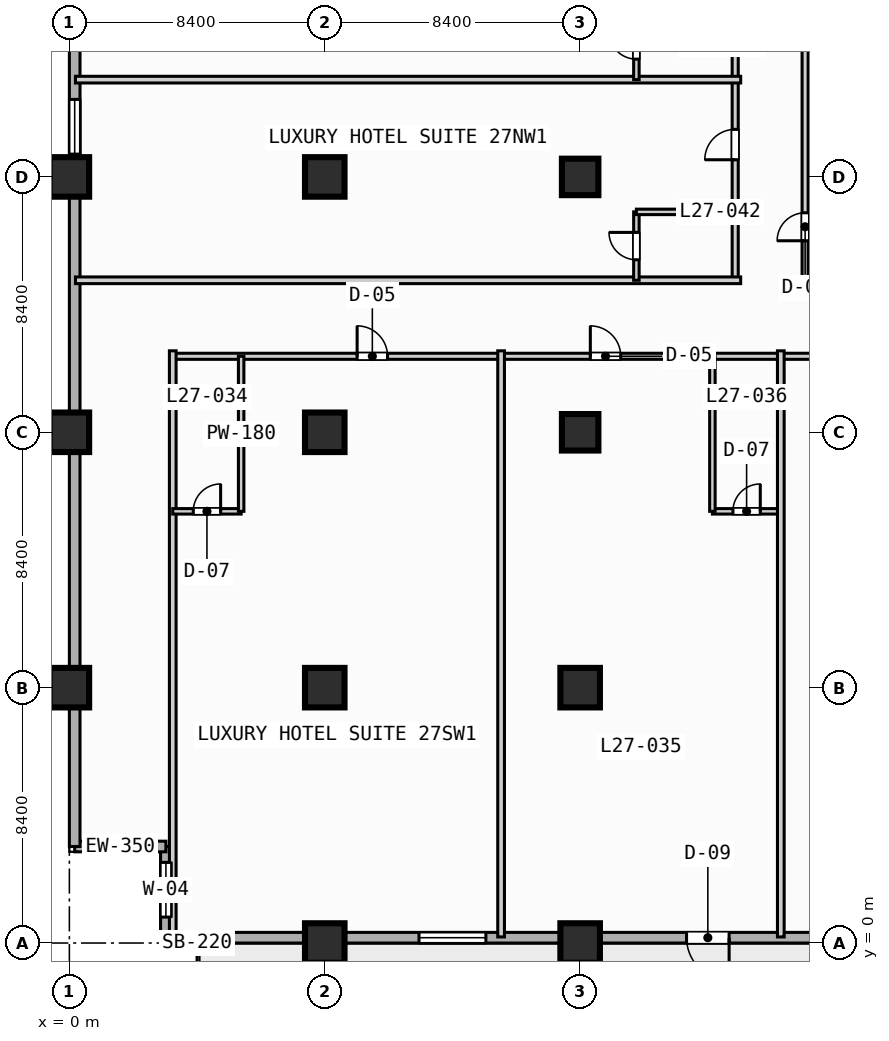
"""IFC4 building model, lengths in metres.
Left out: names, types, materials, properties, quantities, classifications, styles, units other than length and angle.
Written with IfcOpenShell. Run it as: python <this file> out.ifc"""

import sys

from ifc_helpers import new_model, si_unit, direction, frame, frame_2d, origin, origin_2d, place, context, subcontext, project, spatial, rectangle, extrude, element, fill, save


model = new_model("IFC4")
c1 = context("Model", 3, precision=1e-05, world=origin(), true_north=direction((0.0, 1.0)))
c2 = subcontext(c1, "Body", "Model", "MODEL_VIEW")
j1 = project(units=[si_unit("LENGTHUNIT", "METRE"), si_unit("PLANEANGLEUNIT", "RADIAN")], contexts=[c1])
p1 = place(None, origin())
s1 = spatial("IfcSite", under=j1, at=p1, CompositionType="ELEMENT")
p2 = place(p1, origin())
s2 = spatial("IfcBuilding", under=s1, at=p2, CompositionType="ELEMENT")
p3 = place(p2, frame((0.0, 0.0, 115.2)))
s3 = spatial("IfcBuildingStorey", under=s2, at=p3, CompositionType="ELEMENT", Elevation=115.2)
for number, where, z_axis, x_axis in (
    (1, (0.0, 8.4, 0.0), (0.0, 0.0, 1.0), (1.0, 0.0, 0.0)),
    (2, (0.0, 16.8, 0.0), (0.0, 0.0, 1.0), (1.0, 0.0, 0.0)),
    (3, (0.0, 25.2, 0.0), (0.0, 0.0, 1.0), (1.0, 0.0, 0.0)),
    (4, (8.4, 0.0, 0.0), (0.0, 0.0, 1.0), (1.0, 0.0, 0.0)),
    (5, (8.4, 8.4, 0.0), (0.0, 0.0, 1.0), (1.0, 0.0, 0.0)),
    (6, (8.4, 16.8, 0.0), (0.0, 0.0, 1.0), (1.0, 0.0, 0.0)),
    (7, (8.4, 25.2, 0.0), (0.0, 0.0, 1.0), (1.0, 0.0, 0.0)),
    (8, (16.8, 0.0, 0.0), (0.0, 0.0, 1.0), (1.0, 0.0, 0.0)),
    (9, (16.8, 8.4, 0.0), (0.0, 0.0, 1.0), (1.0, 0.0, 0.0)),
):
    element("IfcColumn", number, at=place(p3, frame(where, z_axis=z_axis, x_axis=x_axis)), inside=s3, PredefinedType="COLUMN", context=c2, shape_type="SweptSolid", body=[
        extrude(rectangle(XDim=1.3, YDim=1.3, at=origin_2d()), origin(), (0.0, 0.0, 1.0), 3.8),
    ])
for number, where, z_axis, x_axis in (
    (10, (16.8, 16.8, 0.0), (0.0, 0.0, 1.0), (1.0, 0.0, 0.0)),
    (11, (16.8, 25.2, 0.0), (0.0, 0.0, 1.0), (1.0, 0.0, 0.0)),
):
    element("IfcColumn", number, at=place(p3, frame(where, z_axis=z_axis, x_axis=x_axis)), inside=s3, PredefinedType="COLUMN", context=c2, shape_type="SweptSolid", body=[
        extrude(rectangle(XDim=1.2, YDim=1.2, at=origin_2d()), origin(), (0.0, 0.0, 1.0), 3.8),
    ])
p4 = place(p3, frame((3.175, 0.175, 0.0), z_axis=(0.0, 0.0, 1.0), x_axis=(0.0, 1.0, 0.0)))
e12 = element("IfcWall", 12, at=p4, inside=s3, PredefinedType="STANDARD", context=c2, shape_type="SweptSolid", body=[
    extrude(rectangle(XDim=3.0, YDim=0.35, at=frame_2d((1.5, 0.0))), origin(), (0.0, 0.0, 1.0), 3.55),
])
p5 = place(p4, frame((0.677, 0.0, 0.85)))
e13 = element("IfcOpeningElement", 13, at=p5, cuts=e12, PredefinedType="OPENING", context=c2, shape_type="SweptSolid", body=[
    extrude(rectangle(XDim=1.8, YDim=1.8, at=frame_2d((0.9, 0.9))), frame((0.0, 0.185, 0.0), z_axis=(0.0, -1.0, 0.0), x_axis=(1.0, 0.0, 0.0)), (0.0, 0.0, 1.0), 0.37),
])
p6 = place(p3, frame((3.175, 3.175, 0.0), z_axis=(0.0, 0.0, 1.0), x_axis=(-1.0, 0.0, 0.0)))
e14 = element("IfcWall", 14, at=p6, inside=s3, PredefinedType="STANDARD", context=c2, shape_type="SweptSolid", body=[
    extrude(rectangle(XDim=3.0, YDim=0.35, at=frame_2d((1.5, 0.0))), origin(), (0.0, 0.0, 1.0), 3.55),
])
p7 = place(p3, frame((0.175, 3.175, 0.0), z_axis=(0.0, 0.0, 1.0), x_axis=(0.0, 1.0, 0.0)))
e15 = element("IfcWall", 15, at=p7, inside=s3, PredefinedType="STANDARD", context=c2, shape_type="SweptSolid", body=[
    extrude(rectangle(XDim=86.05, YDim=0.35, at=frame_2d((43.025, 0.0))), origin(), (0.0, 0.0, 1.0), 3.55),
])
p8 = place(p7, frame((42.325, 0.0, 0.0)))
e16 = element("IfcOpeningElement", 16, at=p8, cuts=e15, PredefinedType="OPENING", context=c2, shape_type="SweptSolid", body=[
    extrude(rectangle(XDim=1.4, YDim=2.2, at=frame_2d((0.7, 1.1))), frame((0.0, 0.185, 0.0), z_axis=(0.0, -1.0, 0.0), x_axis=(1.0, 0.0, 0.0)), (0.0, 0.0, 1.0), 0.37),
])
p9 = place(p7, frame((33.525, 0.0, 0.85)))
e17 = element("IfcOpeningElement", 17, at=p9, cuts=e15, PredefinedType="OPENING", context=c2, shape_type="SweptSolid", body=[
    extrude(rectangle(XDim=2.2, YDim=1.8, at=frame_2d((1.1, 0.9))), frame((0.0, 0.185, 0.0), z_axis=(0.0, -1.0, 0.0), x_axis=(1.0, 0.0, 0.0)), (0.0, 0.0, 1.0), 0.37),
])
p10 = place(p7, frame((22.775, 0.0, 0.85)))
e18 = element("IfcOpeningElement", 18, at=p10, cuts=e15, PredefinedType="OPENING", context=c2, shape_type="SweptSolid", body=[
    extrude(rectangle(XDim=1.8, YDim=1.8, at=frame_2d((0.9, 0.9))), frame((0.0, 0.185, 0.0), z_axis=(0.0, -1.0, 0.0), x_axis=(1.0, 0.0, 0.0)), (0.0, 0.0, 1.0), 0.37),
])
p11 = place(p7, frame((27.625, 0.0, 0.85)))
e19 = element("IfcOpeningElement", 19, at=p11, cuts=e15, PredefinedType="OPENING", context=c2, shape_type="SweptSolid", body=[
    extrude(rectangle(XDim=1.8, YDim=1.8, at=frame_2d((0.9, 0.9))), frame((0.0, 0.185, 0.0), z_axis=(0.0, -1.0, 0.0), x_axis=(1.0, 0.0, 0.0)), (0.0, 0.0, 1.0), 0.37),
])
p12 = place(p3, frame((72.425, 0.175, 0.0), z_axis=(0.0, 0.0, 1.0), x_axis=(-1.0, 0.0, 0.0)))
e20 = element("IfcWall", 20, at=p12, inside=s3, PredefinedType="STANDARD", context=c2, shape_type="SweptSolid", body=[
    extrude(rectangle(XDim=69.25, YDim=0.35, at=frame_2d((34.625, 0.0))), origin(), (0.0, 0.0, 1.0), 3.55),
])
p13 = place(p12, frame((50.725, 0.0, 0.0)))
e21 = element("IfcOpeningElement", 21, at=p13, cuts=e20, PredefinedType="OPENING", context=c2, shape_type="SweptSolid", body=[
    extrude(rectangle(XDim=1.4, YDim=2.2, at=frame_2d((0.7, 1.1))), frame((0.0, 0.185, 0.0), z_axis=(0.0, -1.0, 0.0), x_axis=(1.0, 0.0, 0.0)), (0.0, 0.0, 1.0), 0.37),
])
p14 = place(p12, frame((58.725, 0.0, 0.85)))
e22 = element("IfcOpeningElement", 22, at=p14, cuts=e20, PredefinedType="OPENING", context=c2, shape_type="SweptSolid", body=[
    extrude(rectangle(XDim=2.2, YDim=1.8, at=frame_2d((1.1, 0.9))), frame((0.0, 0.185, 0.0), z_axis=(0.0, -1.0, 0.0), x_axis=(1.0, 0.0, 0.0)), (0.0, 0.0, 1.0), 0.37),
])
p15 = place(p12, frame((41.925, 0.0, 0.85)))
e23 = element("IfcOpeningElement", 23, at=p15, cuts=e20, PredefinedType="OPENING", context=c2, shape_type="SweptSolid", body=[
    extrude(rectangle(XDim=2.2, YDim=1.8, at=frame_2d((1.1, 0.9))), frame((0.0, 0.185, 0.0), z_axis=(0.0, -1.0, 0.0), x_axis=(1.0, 0.0, 0.0)), (0.0, 0.0, 1.0), 0.37),
])
p16 = place(p12, frame((33.525, 0.0, 0.85)))
e24 = element("IfcOpeningElement", 24, at=p16, cuts=e20, PredefinedType="OPENING", context=c2, shape_type="SweptSolid", body=[
    extrude(rectangle(XDim=2.2, YDim=1.8, at=frame_2d((1.1, 0.9))), frame((0.0, 0.185, 0.0), z_axis=(0.0, -1.0, 0.0), x_axis=(1.0, 0.0, 0.0)), (0.0, 0.0, 1.0), 0.37),
])
p17 = place(p12, frame((25.125, 0.0, 0.85)))
e25 = element("IfcOpeningElement", 25, at=p17, cuts=e20, PredefinedType="OPENING", context=c2, shape_type="SweptSolid", body=[
    extrude(rectangle(XDim=2.2, YDim=1.8, at=frame_2d((1.1, 0.9))), frame((0.0, 0.185, 0.0), z_axis=(0.0, -1.0, 0.0), x_axis=(1.0, 0.0, 0.0)), (0.0, 0.0, 1.0), 0.37),
])
p18 = place(p12, frame((8.325, 0.0, 0.85)))
e26 = element("IfcOpeningElement", 26, at=p18, cuts=e20, PredefinedType="OPENING", context=c2, shape_type="SweptSolid", body=[
    extrude(rectangle(XDim=2.2, YDim=1.8, at=frame_2d((1.1, 0.9))), frame((0.0, 0.185, 0.0), z_axis=(0.0, -1.0, 0.0), x_axis=(1.0, 0.0, 0.0)), (0.0, 0.0, 1.0), 0.37),
])
p19 = place(p12, frame((2.125, 0.0, 0.85)))
e27 = element("IfcOpeningElement", 27, at=p19, cuts=e20, PredefinedType="OPENING", context=c2, shape_type="SweptSolid", body=[
    extrude(rectangle(XDim=1.8, YDim=1.8, at=frame_2d((0.9, 0.9))), frame((0.0, 0.185, 0.0), z_axis=(0.0, -1.0, 0.0), x_axis=(1.0, 0.0, 0.0)), (0.0, 0.0, 1.0), 0.37),
])
p20 = place(p3, frame((24.2, 21.6, 0.0), z_axis=(0.0, 0.0, 1.0), x_axis=(0.0, 1.0, 0.0)))
e28 = element("IfcWall", 28, at=p20, inside=s3, PredefinedType="PARTITIONING", context=c2, shape_type="SweptSolid", body=[
    extrude(rectangle(XDim=17.6, YDim=0.2, at=frame_2d((8.8, 0.0))), origin(), (0.0, 0.0, 1.0), 3.55),
])
p21 = place(p20, frame((1.5, 0.0, 0.0)))
e29 = element("IfcOpeningElement", 29, at=p21, cuts=e28, PredefinedType="OPENING", context=c2, shape_type="SweptSolid", body=[
    extrude(rectangle(XDim=0.92, YDim=2.1, at=frame_2d((0.46, 1.05))), frame((0.0, 0.11, 0.0), z_axis=(0.0, -1.0, 0.0), x_axis=(1.0, 0.0, 0.0)), (0.0, 0.0, 1.0), 0.22),
])
p22 = place(p20, frame((9.95, 0.0, 0.0)))
e30 = element("IfcOpeningElement", 30, at=p22, cuts=e28, PredefinedType="OPENING", context=c2, shape_type="SweptSolid", body=[
    extrude(rectangle(XDim=0.92, YDim=2.1, at=frame_2d((0.46, 1.05))), frame((0.0, 0.11, 0.0), z_axis=(0.0, -1.0, 0.0), x_axis=(1.0, 0.0, 0.0)), (0.0, 0.0, 1.0), 0.22),
])
p23 = place(p3, frame((24.2, 21.6, 0.0), z_axis=(0.0, 0.0, 1.0), x_axis=(1.0, 0.0, 0.0)))
e31 = element("IfcWall", 31, at=p23, inside=s3, PredefinedType="PARTITIONING", context=c2, shape_type="SweptSolid", body=[
    extrude(rectangle(XDim=9.1, YDim=0.2, at=frame_2d((4.55, 0.0))), origin(), (0.0, 0.0, 1.0), 3.55),
])
p24 = place(p3, frame((3.4, 19.3, 0.0), z_axis=(0.0, 0.0, 1.0), x_axis=(1.0, 0.0, 0.0)))
e32 = element("IfcWall", 32, at=p24, inside=s3, PredefinedType="PARTITIONING", context=c2, shape_type="SweptSolid", body=[
    extrude(rectangle(XDim=35.8, YDim=0.2, at=frame_2d((17.9, 0.0))), origin(), (0.0, 0.0, 1.0), 3.55),
])
p25 = place(p24, frame((6.065, 0.0, 0.0)))
e33 = element("IfcOpeningElement", 33, at=p25, cuts=e32, PredefinedType="OPENING", context=c2, shape_type="SweptSolid", body=[
    extrude(rectangle(XDim=1.0, YDim=2.15, at=frame_2d((0.5, 1.075))), frame((0.0, 0.11, 0.0), z_axis=(0.0, -1.0, 0.0), x_axis=(1.0, 0.0, 0.0)), (0.0, 0.0, 1.0), 0.22),
])
p26 = place(p24, frame((13.735, 0.0, 0.0)))
e34 = element("IfcOpeningElement", 34, at=p26, cuts=e32, PredefinedType="OPENING", context=c2, shape_type="SweptSolid", body=[
    extrude(rectangle(XDim=1.0, YDim=2.15, at=frame_2d((0.5, 1.075))), frame((0.0, 0.11, 0.0), z_axis=(0.0, -1.0, 0.0), x_axis=(1.0, 0.0, 0.0)), (0.0, 0.0, 1.0), 0.22),
])
p27 = place(p24, frame((22.96, 0.0, 0.0)))
e35 = element("IfcOpeningElement", 35, at=p27, cuts=e32, PredefinedType="OPENING", context=c2, shape_type="SweptSolid", body=[
    extrude(rectangle(XDim=1.0, YDim=2.15, at=frame_2d((0.5, 1.075))), frame((0.0, 0.11, 0.0), z_axis=(0.0, -1.0, 0.0), x_axis=(1.0, 0.0, 0.0)), (0.0, 0.0, 1.0), 0.22),
])
p28 = place(p24, frame((30.86, 0.0, 0.0)))
e36 = element("IfcOpeningElement", 36, at=p28, cuts=e32, PredefinedType="OPENING", context=c2, shape_type="SweptSolid", body=[
    extrude(rectangle(XDim=1.0, YDim=2.15, at=frame_2d((0.5, 1.075))), frame((0.0, 0.11, 0.0), z_axis=(0.0, -1.0, 0.0), x_axis=(1.0, 0.0, 0.0)), (0.0, 0.0, 1.0), 0.22),
])
p29 = place(p3, frame((3.4, 0.2, 0.0), z_axis=(0.0, 0.0, 1.0), x_axis=(0.0, 1.0, 0.0)))
e37 = element("IfcWall", 37, at=p29, inside=s3, PredefinedType="PARTITIONING", context=c2, shape_type="SweptSolid", body=[
    extrude(rectangle(XDim=19.28, YDim=0.22, at=frame_2d((9.64, 0.0))), origin(), (0.0, 0.0, 1.0), 3.55),
])
p30 = place(p3, frame((3.4, 14.2, 0.0), z_axis=(0.0, 0.0, 1.0), x_axis=(1.0, 0.0, 0.0)))
e38 = element("IfcWall", 38, at=p30, inside=s3, PredefinedType="PLUMBINGWALL", context=c2, shape_type="SweptSolid", body=[
    extrude(rectangle(XDim=2.25, YDim=0.18, at=frame_2d((1.125, 0.0))), origin(), (0.0, 0.0, 1.0), 3.55),
])
p31 = place(p30, frame((0.675, 0.0, 0.0)))
e39 = element("IfcOpeningElement", 39, at=p31, cuts=e38, PredefinedType="OPENING", context=c2, shape_type="SweptSolid", body=[
    extrude(rectangle(XDim=0.9, YDim=2.1, at=frame_2d((0.45, 1.05))), frame((0.0, 0.1, 0.0), z_axis=(0.0, -1.0, 0.0), x_axis=(1.0, 0.0, 0.0)), (0.0, 0.0, 1.0), 0.2),
])
p32 = place(p3, frame((5.65, 14.2, 0.0), z_axis=(0.0, 0.0, 1.0), x_axis=(0.0, 1.0, 0.0)))
e40 = element("IfcWall", 40, at=p32, inside=s3, PredefinedType="PLUMBINGWALL", context=c2, shape_type="SweptSolid", body=[
    extrude(rectangle(XDim=5.1, YDim=0.18, at=frame_2d((2.55, 0.0))), origin(), (0.0, 0.0, 1.0), 3.55),
])
p33 = place(p3, frame((14.2, 0.2, 0.0), z_axis=(0.0, 0.0, 1.0), x_axis=(0.0, 1.0, 0.0)))
e41 = element("IfcWall", 41, at=p33, inside=s3, PredefinedType="PARTITIONING", context=c2, shape_type="SweptSolid", body=[
    extrude(rectangle(XDim=19.28, YDim=0.22, at=frame_2d((9.64, 0.0))), origin(), (0.0, 0.0, 1.0), 3.55),
])
p34 = place(p3, frame((21.15, 14.2, 0.0), z_axis=(0.0, 0.0, 1.0), x_axis=(1.0, 0.0, 0.0)))
e42 = element("IfcWall", 42, at=p34, inside=s3, PredefinedType="PLUMBINGWALL", context=c2, shape_type="SweptSolid", body=[
    extrude(rectangle(XDim=2.25, YDim=0.18, at=frame_2d((1.125, 0.0))), origin(), (0.0, 0.0, 1.0), 3.55),
])
p35 = place(p34, frame((0.675, 0.0, 0.0)))
e43 = element("IfcOpeningElement", 43, at=p35, cuts=e42, PredefinedType="OPENING", context=c2, shape_type="SweptSolid", body=[
    extrude(rectangle(XDim=0.9, YDim=2.1, at=frame_2d((0.45, 1.05))), frame((0.0, 0.1, 0.0), z_axis=(0.0, -1.0, 0.0), x_axis=(1.0, 0.0, 0.0)), (0.0, 0.0, 1.0), 0.2),
])
p36 = place(p3, frame((21.15, 14.2, 0.0), z_axis=(0.0, 0.0, 1.0), x_axis=(0.0, 1.0, 0.0)))
e44 = element("IfcWall", 44, at=p36, inside=s3, PredefinedType="PLUMBINGWALL", context=c2, shape_type="SweptSolid", body=[
    extrude(rectangle(XDim=5.1, YDim=0.18, at=frame_2d((2.55, 0.0))), origin(), (0.0, 0.0, 1.0), 3.55),
])
p37 = place(p3, frame((23.4, 0.2, 0.0), z_axis=(0.0, 0.0, 1.0), x_axis=(0.0, 1.0, 0.0)))
e45 = element("IfcWall", 45, at=p37, inside=s3, PredefinedType="PARTITIONING", context=c2, shape_type="SweptSolid", body=[
    extrude(rectangle(XDim=19.28, YDim=0.22, at=frame_2d((9.64, 0.0))), origin(), (0.0, 0.0, 1.0), 3.55),
])
p38 = place(p3, frame((21.9, 21.8, 0.0), z_axis=(0.0, 0.0, 1.0), x_axis=(0.0, 1.0, 0.0)))
e46 = element("IfcWall", 46, at=p38, inside=s3, PredefinedType="PARTITIONING", context=c2, shape_type="SweptSolid", body=[
    extrude(rectangle(XDim=17.4, YDim=0.2, at=frame_2d((8.7, 0.0))), origin(), (0.0, 0.0, 1.0), 3.55),
])
p39 = place(p38, frame((3.965, 0.0, 0.0)))
e47 = element("IfcOpeningElement", 47, at=p39, cuts=e46, PredefinedType="OPENING", context=c2, shape_type="SweptSolid", body=[
    extrude(rectangle(XDim=1.0, YDim=2.15, at=frame_2d((0.5, 1.075))), frame((0.0, 0.11, 0.0), z_axis=(0.0, -1.0, 0.0), x_axis=(1.0, 0.0, 0.0)), (0.0, 0.0, 1.0), 0.22),
])
p40 = place(p38, frame((10.565, 0.0, 0.0)))
e48 = element("IfcOpeningElement", 48, at=p40, cuts=e46, PredefinedType="OPENING", context=c2, shape_type="SweptSolid", body=[
    extrude(rectangle(XDim=1.0, YDim=2.15, at=frame_2d((0.5, 1.075))), frame((0.0, 0.11, 0.0), z_axis=(0.0, -1.0, 0.0), x_axis=(1.0, 0.0, 0.0)), (0.0, 0.0, 1.0), 0.22),
])
p41 = place(p38, frame((13.735, 0.0, 0.0)))
e49 = element("IfcOpeningElement", 49, at=p41, cuts=e46, PredefinedType="OPENING", context=c2, shape_type="SweptSolid", body=[
    extrude(rectangle(XDim=1.0, YDim=2.15, at=frame_2d((0.5, 1.075))), frame((0.0, 0.11, 0.0), z_axis=(0.0, -1.0, 0.0), x_axis=(1.0, 0.0, 0.0)), (0.0, 0.0, 1.0), 0.22),
])
p42 = place(p3, frame((0.2, 21.8, 0.0), z_axis=(0.0, 0.0, 1.0), x_axis=(1.0, 0.0, 0.0)))
e50 = element("IfcWall", 50, at=p42, inside=s3, PredefinedType="PARTITIONING", context=c2, shape_type="SweptSolid", body=[
    extrude(rectangle(XDim=21.88, YDim=0.22, at=frame_2d((10.94, 0.0))), origin(), (0.0, 0.0, 1.0), 3.55),
])
p43 = place(p3, frame((18.65, 21.8, 0.0), z_axis=(0.0, 0.0, 1.0), x_axis=(0.0, 1.0, 0.0)))
e51 = element("IfcWall", 51, at=p43, inside=s3, PredefinedType="PLUMBINGWALL", context=c2, shape_type="SweptSolid", body=[
    extrude(rectangle(XDim=2.25, YDim=0.18, at=frame_2d((1.125, 0.0))), origin(), (0.0, 0.0, 1.0), 3.55),
])
p44 = place(p43, frame((0.675, 0.0, 0.0)))
e52 = element("IfcOpeningElement", 52, at=p44, cuts=e51, PredefinedType="OPENING", context=c2, shape_type="SweptSolid", body=[
    extrude(rectangle(XDim=0.9, YDim=2.1, at=frame_2d((0.45, 1.05))), frame((0.0, 0.1, 0.0), z_axis=(0.0, -1.0, 0.0), x_axis=(1.0, 0.0, 0.0)), (0.0, 0.0, 1.0), 0.2),
])
p45 = place(p3, frame((18.65, 24.05, 0.0), z_axis=(0.0, 0.0, 1.0), x_axis=(1.0, 0.0, 0.0)))
e53 = element("IfcWall", 53, at=p45, inside=s3, PredefinedType="PLUMBINGWALL", context=c2, shape_type="SweptSolid", body=[
    extrude(rectangle(XDim=3.25, YDim=0.18, at=frame_2d((1.625, 0.0))), origin(), (0.0, 0.0, 1.0), 3.55),
])
p46 = place(p3, frame((0.2, 28.4, 0.0), z_axis=(0.0, 0.0, 1.0), x_axis=(1.0, 0.0, 0.0)))
e54 = element("IfcWall", 54, at=p46, inside=s3, PredefinedType="PARTITIONING", context=c2, shape_type="SweptSolid", body=[
    extrude(rectangle(XDim=21.88, YDim=0.22, at=frame_2d((10.94, 0.0))), origin(), (0.0, 0.0, 1.0), 3.55),
])
p47 = place(p3, frame((18.65, 28.4, 0.0), z_axis=(0.0, 0.0, 1.0), x_axis=(0.0, 1.0, 0.0)))
e55 = element("IfcWall", 55, at=p47, inside=s3, PredefinedType="PLUMBINGWALL", context=c2, shape_type="SweptSolid", body=[
    extrude(rectangle(XDim=2.25, YDim=0.18, at=frame_2d((1.125, 0.0))), origin(), (0.0, 0.0, 1.0), 3.55),
])
p48 = place(p47, frame((0.675, 0.0, 0.0)))
e56 = element("IfcOpeningElement", 56, at=p48, cuts=e55, PredefinedType="OPENING", context=c2, shape_type="SweptSolid", body=[
    extrude(rectangle(XDim=0.9, YDim=2.1, at=frame_2d((0.45, 1.05))), frame((0.0, 0.1, 0.0), z_axis=(0.0, -1.0, 0.0), x_axis=(1.0, 0.0, 0.0)), (0.0, 0.0, 1.0), 0.2),
])
p49 = place(p5, origin())
e57 = element("IfcWindow", 57, at=p49, inside=s3, PartitioningType="SINGLE_PANEL", PredefinedType="WINDOW", context=c2, shape_type="SweptSolid", body=[
    extrude(rectangle(XDim=1.8, YDim=1.8, at=frame_2d((0.9, 0.9))), frame((0.0, 0.03, 0.0), z_axis=(0.0, -1.0, 0.0), x_axis=(1.0, 0.0, 0.0)), (0.0, 0.0, 1.0), 0.06),
])
fill(e13, e57)
p50 = place(p10, origin())
e58 = element("IfcWindow", 58, at=p50, inside=s3, PartitioningType="SINGLE_PANEL", PredefinedType="WINDOW", context=c2, shape_type="SweptSolid", body=[
    extrude(rectangle(XDim=1.8, YDim=1.8, at=frame_2d((0.9, 0.9))), frame((0.0, 0.03, 0.0), z_axis=(0.0, -1.0, 0.0), x_axis=(1.0, 0.0, 0.0)), (0.0, 0.0, 1.0), 0.06),
])
fill(e18, e58)
p51 = place(p13, origin())
e59 = element("IfcDoor", 59, at=p51, inside=s3, OperationType="SINGLE_SWING_LEFT", PredefinedType="DOOR", context=c2, shape_type="SweptSolid", body=[
    extrude(rectangle(XDim=1.4, YDim=2.2, at=frame_2d((0.7, 1.1))), frame((0.0, 0.025, 0.0), z_axis=(0.0, -1.0, 0.0), x_axis=(1.0, 0.0, 0.0)), (0.0, 0.0, 1.0), 0.05),
])
fill(e21, e59)
p52 = place(p14, origin())
e60 = element("IfcWindow", 60, at=p52, inside=s3, PartitioningType="SINGLE_PANEL", PredefinedType="WINDOW", context=c2, shape_type="SweptSolid", body=[
    extrude(rectangle(XDim=2.2, YDim=1.8, at=frame_2d((1.1, 0.9))), frame((0.0, 0.03, 0.0), z_axis=(0.0, -1.0, 0.0), x_axis=(1.0, 0.0, 0.0)), (0.0, 0.0, 1.0), 0.06),
])
fill(e22, e60)
p53 = place(p21, origin())
e61 = element("IfcDoor", 61, at=p53, inside=s3, OperationType="SINGLE_SWING_LEFT", PredefinedType="DOOR", context=c2, shape_type="SweptSolid", body=[
    extrude(rectangle(XDim=0.92, YDim=2.1, at=frame_2d((0.46, 1.05))), frame((0.0, 0.025, 0.0), z_axis=(0.0, -1.0, 0.0), x_axis=(1.0, 0.0, 0.0)), (0.0, 0.0, 1.0), 0.05),
])
fill(e29, e61)
p54 = place(p25, origin())
e62 = element("IfcDoor", 62, at=p54, inside=s3, OperationType="SINGLE_SWING_LEFT", PredefinedType="DOOR", context=c2, shape_type="SweptSolid", body=[
    extrude(rectangle(XDim=1.0, YDim=2.15, at=frame_2d((0.5, 1.075))), frame((0.0, 0.025, 0.0), z_axis=(0.0, -1.0, 0.0), x_axis=(1.0, 0.0, 0.0)), (0.0, 0.0, 1.0), 0.05),
])
fill(e33, e62)
p55 = place(p26, origin())
e63 = element("IfcDoor", 63, at=p55, inside=s3, OperationType="SINGLE_SWING_LEFT", PredefinedType="DOOR", context=c2, shape_type="SweptSolid", body=[
    extrude(rectangle(XDim=1.0, YDim=2.15, at=frame_2d((0.5, 1.075))), frame((0.0, 0.025, 0.0), z_axis=(0.0, -1.0, 0.0), x_axis=(1.0, 0.0, 0.0)), (0.0, 0.0, 1.0), 0.05),
])
fill(e34, e63)
p56 = place(p31, origin())
e64 = element("IfcDoor", 64, at=p56, inside=s3, OperationType="SINGLE_SWING_RIGHT", PredefinedType="DOOR", context=c2, shape_type="SweptSolid", body=[
    extrude(rectangle(XDim=0.9, YDim=2.1, at=frame_2d((0.45, 1.05))), frame((0.0, 0.025, 0.0), z_axis=(0.0, -1.0, 0.0), x_axis=(1.0, 0.0, 0.0)), (0.0, 0.0, 1.0), 0.05),
])
fill(e39, e64)
p57 = place(p35, origin())
e65 = element("IfcDoor", 65, at=p57, inside=s3, OperationType="SINGLE_SWING_RIGHT", PredefinedType="DOOR", context=c2, shape_type="SweptSolid", body=[
    extrude(rectangle(XDim=0.9, YDim=2.1, at=frame_2d((0.45, 1.05))), frame((0.0, 0.025, 0.0), z_axis=(0.0, -1.0, 0.0), x_axis=(1.0, 0.0, 0.0)), (0.0, 0.0, 1.0), 0.05),
])
fill(e43, e65)
p58 = place(p39, origin())
e66 = element("IfcDoor", 66, at=p58, inside=s3, OperationType="SINGLE_SWING_LEFT", PredefinedType="DOOR", context=c2, shape_type="SweptSolid", body=[
    extrude(rectangle(XDim=1.0, YDim=2.15, at=frame_2d((0.5, 1.075))), frame((0.0, 0.025, 0.0), z_axis=(0.0, -1.0, 0.0), x_axis=(1.0, 0.0, 0.0)), (0.0, 0.0, 1.0), 0.05),
])
fill(e47, e66)
p59 = place(p44, origin())
e67 = element("IfcDoor", 67, at=p59, inside=s3, OperationType="SINGLE_SWING_RIGHT", PredefinedType="DOOR", context=c2, shape_type="SweptSolid", body=[
    extrude(rectangle(XDim=0.9, YDim=2.1, at=frame_2d((0.45, 1.05))), frame((0.0, 0.025, 0.0), z_axis=(0.0, -1.0, 0.0), x_axis=(1.0, 0.0, 0.0)), (0.0, 0.0, 1.0), 0.05),
])
fill(e52, e67)
p60 = place(p48, origin())
e68 = element("IfcDoor", 68, at=p60, inside=s3, OperationType="SINGLE_SWING_RIGHT", PredefinedType="DOOR", context=c2, shape_type="SweptSolid", body=[
    extrude(rectangle(XDim=0.9, YDim=2.1, at=frame_2d((0.45, 1.05))), frame((0.0, 0.025, 0.0), z_axis=(0.0, -1.0, 0.0), x_axis=(1.0, 0.0, 0.0)), (0.0, 0.0, 1.0), 0.05),
])
fill(e56, e68)
save(model, sys.argv[1])
